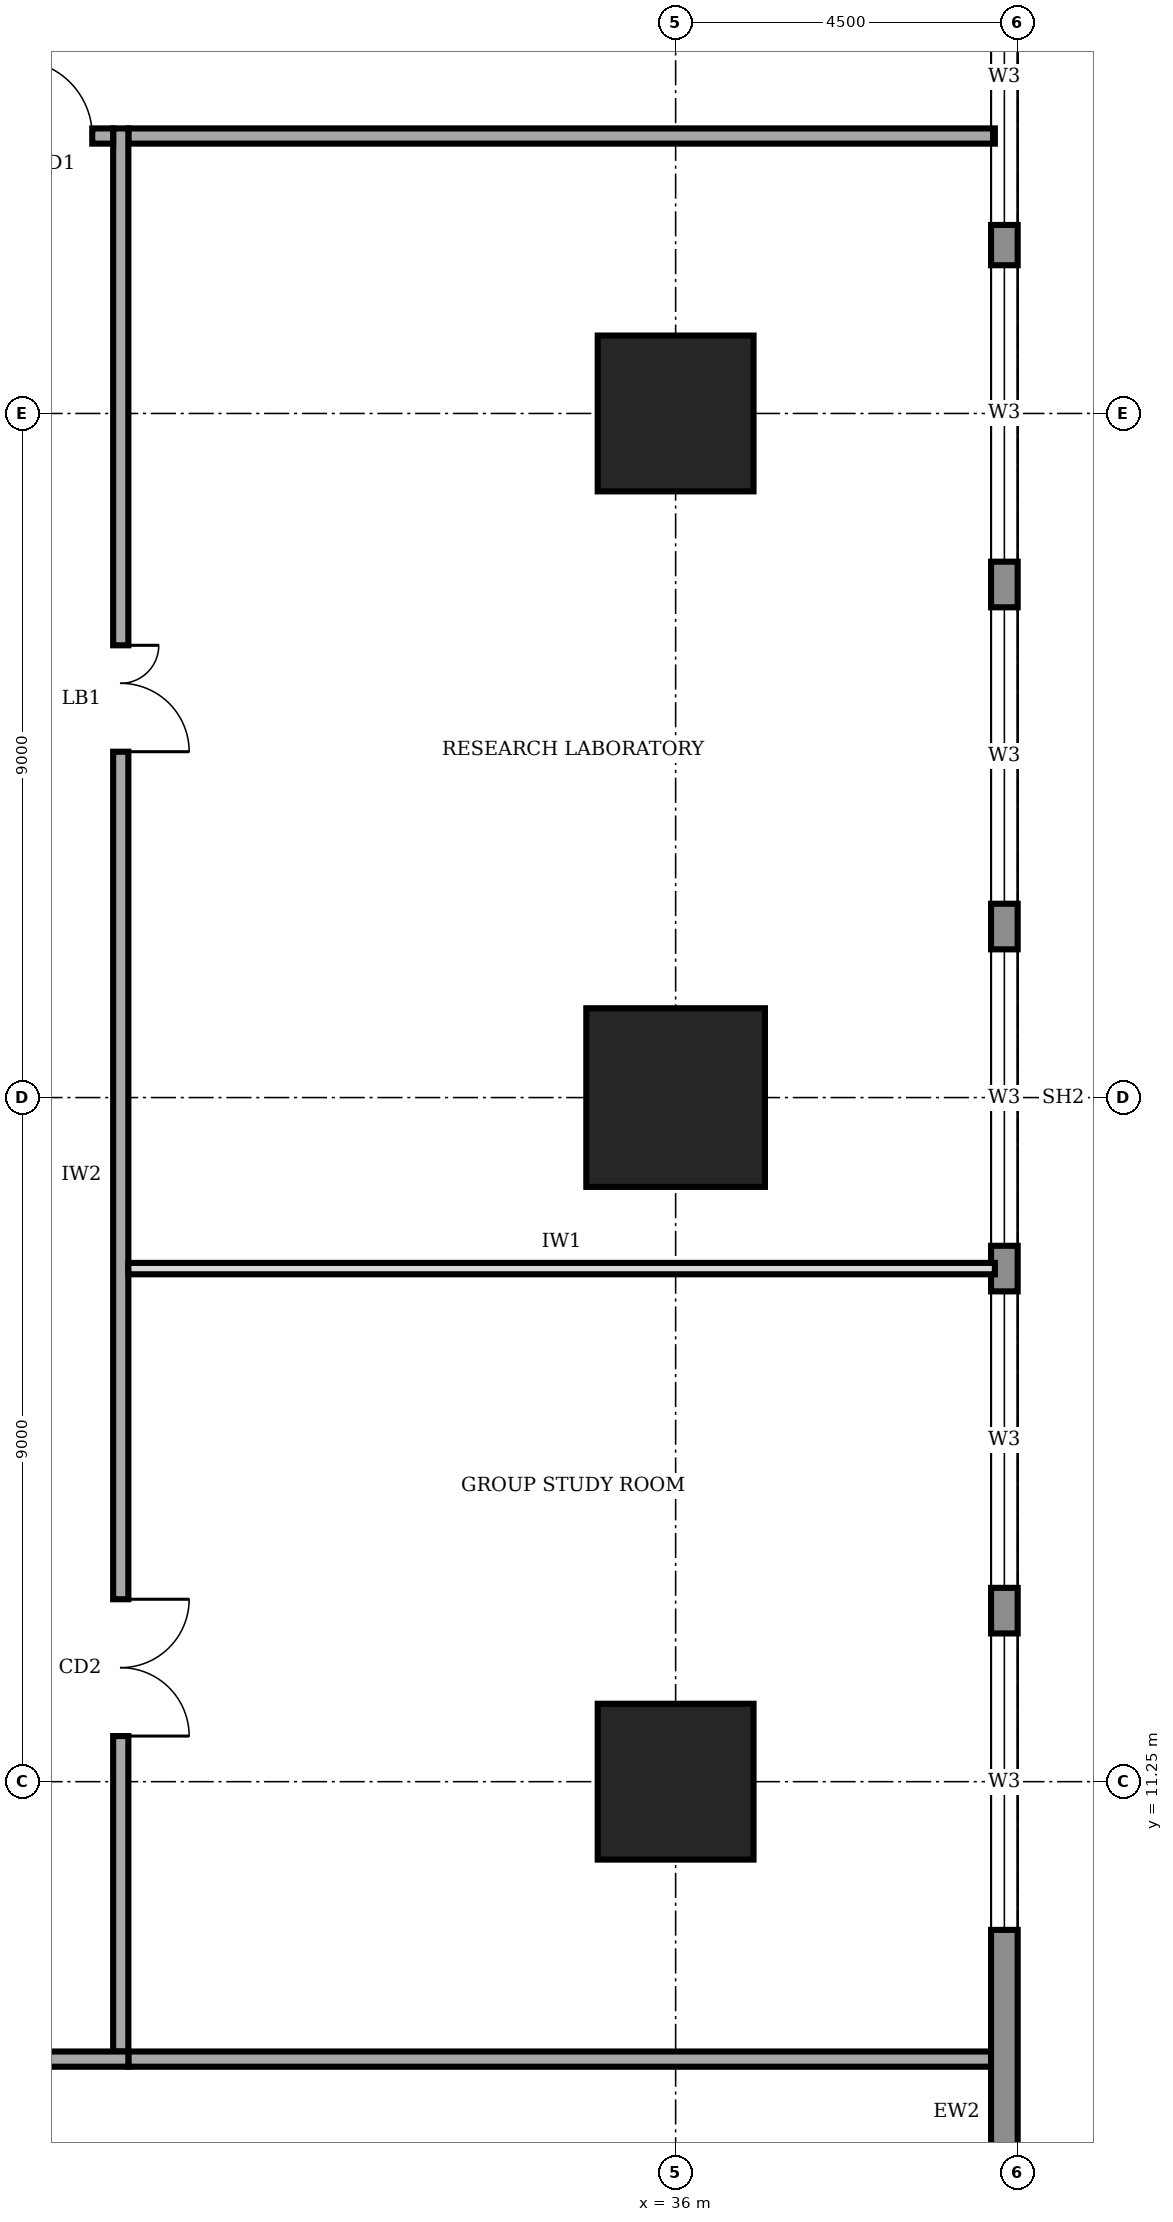
"""IFC4 building model, lengths in metres.
Left out: names, types, materials, properties, quantities, classifications, styles, units other than length and angle.
Written with IfcOpenShell. Run it as: python <this file> out.ifc"""

import sys

from ifc_helpers import new_model, si_unit, direction, frame, frame_2d, origin, origin_2d, place, context, subcontext, project, spatial, rectangle, extrude, element, fill, save


model = new_model("IFC4")
c1 = context("Model", 3, precision=1e-05, world=origin(), true_north=direction((0.0, 1.0)))
c2 = subcontext(c1, "Body", "Model", "MODEL_VIEW")
j1 = project(units=[si_unit("LENGTHUNIT", "METRE"), si_unit("PLANEANGLEUNIT", "RADIAN")], contexts=[c1])
p1 = place(None, origin())
s1 = spatial("IfcSite", under=j1, at=p1, CompositionType="ELEMENT")
p2 = place(p1, origin())
s2 = spatial("IfcBuilding", under=s1, at=p2, CompositionType="ELEMENT")
p3 = place(p2, frame((0.0, 0.0, 189.0)))
s3 = spatial("IfcBuildingStorey", under=s2, at=p3, CompositionType="ELEMENT", Elevation=189.0)
p4 = place(p3, frame((36.0, 11.25, 0.0), z_axis=(0.0, 0.0, 1.0), x_axis=(1.0, 0.0, 0.0)))
e1 = element("IfcColumn", 1, at=p4, inside=s3, PredefinedType="COLUMN", context=c2, shape_type="SweptSolid", body=[
    extrude(rectangle(XDim=2.05, YDim=2.05, at=origin_2d()), origin(), (0.0, 0.0, 1.0), 4.0),
])
p5 = place(p3, frame((36.0, 20.25, 0.0), z_axis=(0.0, 0.0, 1.0), x_axis=(1.0, 0.0, 0.0)))
e2 = element("IfcColumn", 2, at=p5, inside=s3, PredefinedType="COLUMN", context=c2, shape_type="SweptSolid", body=[
    extrude(rectangle(XDim=2.35, YDim=2.35, at=origin_2d()), origin(), (0.0, 0.0, 1.0), 4.0),
])
p6 = place(p3, frame((36.0, 29.25, 0.0), z_axis=(0.0, 0.0, 1.0), x_axis=(1.0, 0.0, 0.0)))
e3 = element("IfcColumn", 3, at=p6, inside=s3, PredefinedType="COLUMN", context=c2, shape_type="SweptSolid", body=[
    extrude(rectangle(XDim=2.05, YDim=2.05, at=origin_2d()), origin(), (0.0, 0.0, 1.0), 4.0),
])
p7 = place(p3, frame((40.325, 4.52, 0.0), z_axis=(0.0, 0.0, 1.0), x_axis=(0.0, 1.0, 0.0)))
e4 = element("IfcWall", 4, at=p7, inside=s3, PredefinedType="STANDARD", context=c2, shape_type="SweptSolid", body=[
    extrude(rectangle(XDim=31.46, YDim=0.35, at=frame_2d((15.73, 0.0))), origin(), (0.0, 0.0, 1.0), 3.75),
])
p8 = place(p7, frame((4.78, 0.0, 0.95)))
e5 = element("IfcOpeningElement", 5, at=p8, cuts=e4, PredefinedType="OPENING", context=c2, shape_type="SweptSolid", body=[
    extrude(rectangle(XDim=3.9, YDim=1.8, at=frame_2d((1.95, 0.9))), frame((0.0, 0.185, 0.0), z_axis=(0.0, -1.0, 0.0), x_axis=(1.0, 0.0, 0.0)), (0.0, 0.0, 1.0), 0.37),
])
p9 = place(p7, frame((9.28, 0.0, 0.95)))
e6 = element("IfcOpeningElement", 6, at=p9, cuts=e4, PredefinedType="OPENING", context=c2, shape_type="SweptSolid", body=[
    extrude(rectangle(XDim=3.9, YDim=1.8, at=frame_2d((1.95, 0.9))), frame((0.0, 0.185, 0.0), z_axis=(0.0, -1.0, 0.0), x_axis=(1.0, 0.0, 0.0)), (0.0, 0.0, 1.0), 0.37),
])
p10 = place(p7, frame((13.78, 0.0, 0.95)))
e7 = element("IfcOpeningElement", 7, at=p10, cuts=e4, PredefinedType="OPENING", context=c2, shape_type="SweptSolid", body=[
    extrude(rectangle(XDim=3.9, YDim=1.8, at=frame_2d((1.95, 0.9))), frame((0.0, 0.185, 0.0), z_axis=(0.0, -1.0, 0.0), x_axis=(1.0, 0.0, 0.0)), (0.0, 0.0, 1.0), 0.37),
])
p11 = place(p7, frame((18.28, 0.0, 0.95)))
e8 = element("IfcOpeningElement", 8, at=p11, cuts=e4, PredefinedType="OPENING", context=c2, shape_type="SweptSolid", body=[
    extrude(rectangle(XDim=3.9, YDim=1.8, at=frame_2d((1.95, 0.9))), frame((0.0, 0.185, 0.0), z_axis=(0.0, -1.0, 0.0), x_axis=(1.0, 0.0, 0.0)), (0.0, 0.0, 1.0), 0.37),
])
p12 = place(p7, frame((22.78, 0.0, 0.95)))
e9 = element("IfcOpeningElement", 9, at=p12, cuts=e4, PredefinedType="OPENING", context=c2, shape_type="SweptSolid", body=[
    extrude(rectangle(XDim=3.9, YDim=1.8, at=frame_2d((1.95, 0.9))), frame((0.0, 0.185, 0.0), z_axis=(0.0, -1.0, 0.0), x_axis=(1.0, 0.0, 0.0)), (0.0, 0.0, 1.0), 0.37),
])
p13 = place(p7, frame((27.21, 0.0, 0.95)))
e10 = element("IfcOpeningElement", 10, at=p13, cuts=e4, PredefinedType="OPENING", context=c2, shape_type="SweptSolid", body=[
    extrude(rectangle(XDim=3.9, YDim=1.8, at=frame_2d((1.95, 0.9))), frame((0.0, 0.185, 0.0), z_axis=(0.0, -1.0, 0.0), x_axis=(1.0, 0.0, 0.0)), (0.0, 0.0, 1.0), 0.37),
])
p14 = place(p3, frame((11.9, 7.6, 0.0), z_axis=(0.0, 0.0, 1.0), x_axis=(1.0, 0.0, 0.0)))
e11 = element("IfcWall", 11, at=p14, inside=s3, PredefinedType="SOLIDWALL", context=c2, shape_type="SweptSolid", body=[
    extrude(rectangle(XDim=16.9, YDim=0.2, at=frame_2d((8.45, 0.0))), origin(), (0.0, 0.0, 1.0), 3.75),
])
p15 = place(p14, frame((2.05, 0.0, 0.0)))
e12 = element("IfcOpeningElement", 12, at=p15, cuts=e11, PredefinedType="OPENING", context=c2, shape_type="SweptSolid", body=[
    extrude(rectangle(XDim=1.8, YDim=2.1, at=frame_2d((0.9, 1.05))), frame((0.0, 0.11, 0.0), z_axis=(0.0, -1.0, 0.0), x_axis=(1.0, 0.0, 0.0)), (0.0, 0.0, 1.0), 0.22),
])
p16 = place(p14, frame((7.85, 0.0, 0.0)))
e13 = element("IfcOpeningElement", 13, at=p16, cuts=e11, PredefinedType="OPENING", context=c2, shape_type="SweptSolid", body=[
    extrude(rectangle(XDim=1.0, YDim=2.1, at=frame_2d((0.5, 1.05))), frame((0.0, 0.11, 0.0), z_axis=(0.0, -1.0, 0.0), x_axis=(1.0, 0.0, 0.0)), (0.0, 0.0, 1.0), 0.22),
])
p17 = place(p14, frame((12.85, 0.0, 0.0)))
e14 = element("IfcOpeningElement", 14, at=p17, cuts=e11, PredefinedType="OPENING", context=c2, shape_type="SweptSolid", body=[
    extrude(rectangle(XDim=1.8, YDim=2.1, at=frame_2d((0.9, 1.05))), frame((0.0, 0.11, 0.0), z_axis=(0.0, -1.0, 0.0), x_axis=(1.0, 0.0, 0.0)), (0.0, 0.0, 1.0), 0.22),
])
p18 = place(p3, frame((28.7, 7.7, 0.0), z_axis=(0.0, 0.0, 1.0), x_axis=(0.0, 1.0, 0.0)))
e15 = element("IfcWall", 15, at=p18, inside=s3, PredefinedType="SOLIDWALL", context=c2, shape_type="SweptSolid", body=[
    extrude(rectangle(XDim=25.3, YDim=0.2, at=frame_2d((12.65, 0.0))), origin(), (0.0, 0.0, 1.0), 3.75),
])
p19 = place(p18, frame((4.15, 0.0, 0.0)))
e16 = element("IfcOpeningElement", 16, at=p19, cuts=e15, PredefinedType="OPENING", context=c2, shape_type="SweptSolid", body=[
    extrude(rectangle(XDim=1.8, YDim=2.1, at=frame_2d((0.9, 1.05))), frame((0.0, 0.11, 0.0), z_axis=(0.0, -1.0, 0.0), x_axis=(1.0, 0.0, 0.0)), (0.0, 0.0, 1.0), 0.22),
])
p20 = place(p18, frame((17.1, 0.0, 0.0)))
e17 = element("IfcOpeningElement", 17, at=p20, cuts=e15, PredefinedType="OPENING", context=c2, shape_type="SweptSolid", body=[
    extrude(rectangle(XDim=1.4, YDim=2.1, at=frame_2d((0.7, 1.05))), frame((0.0, 0.11, 0.0), z_axis=(0.0, -1.0, 0.0), x_axis=(1.0, 0.0, 0.0)), (0.0, 0.0, 1.0), 0.22),
])
p21 = place(p3, frame((28.6, 32.9, 0.0), z_axis=(0.0, 0.0, 1.0), x_axis=(-1.0, 0.0, 0.0)))
e18 = element("IfcWall", 18, at=p21, inside=s3, PredefinedType="SOLIDWALL", context=c2, shape_type="SweptSolid", body=[
    extrude(rectangle(XDim=16.9, YDim=0.2, at=frame_2d((8.45, 0.0))), origin(), (0.0, 0.0, 1.0), 3.75),
])
p22 = place(p21, frame((15.425, 0.0, 0.0)))
e19 = element("IfcOpeningElement", 19, at=p22, cuts=e18, PredefinedType="OPENING", context=c2, shape_type="SweptSolid", body=[
    extrude(rectangle(XDim=1.0, YDim=2.1, at=frame_2d((0.5, 1.05))), frame((0.0, 0.11, 0.0), z_axis=(0.0, -1.0, 0.0), x_axis=(1.0, 0.0, 0.0)), (0.0, 0.0, 1.0), 0.22),
])
p23 = place(p21, frame((12.35, 0.0, 0.0)))
e20 = element("IfcOpeningElement", 20, at=p23, cuts=e18, PredefinedType="OPENING", context=c2, shape_type="SweptSolid", body=[
    extrude(rectangle(XDim=1.0, YDim=2.1, at=frame_2d((0.5, 1.05))), frame((0.0, 0.11, 0.0), z_axis=(0.0, -1.0, 0.0), x_axis=(1.0, 0.0, 0.0)), (0.0, 0.0, 1.0), 0.22),
])
p24 = place(p21, frame((5.6, 0.0, 0.0)))
e21 = element("IfcOpeningElement", 21, at=p24, cuts=e18, PredefinedType="OPENING", context=c2, shape_type="SweptSolid", body=[
    extrude(rectangle(XDim=1.0, YDim=2.1, at=frame_2d((0.5, 1.05))), frame((0.0, 0.11, 0.0), z_axis=(0.0, -1.0, 0.0), x_axis=(1.0, 0.0, 0.0)), (0.0, 0.0, 1.0), 0.22),
])
p25 = place(p21, frame((0.275, 0.0, 0.0)))
e22 = element("IfcOpeningElement", 22, at=p25, cuts=e18, PredefinedType="OPENING", context=c2, shape_type="SweptSolid", body=[
    extrude(rectangle(XDim=1.0, YDim=2.1, at=frame_2d((0.5, 1.05))), frame((0.0, 0.11, 0.0), z_axis=(0.0, -1.0, 0.0), x_axis=(1.0, 0.0, 0.0)), (0.0, 0.0, 1.0), 0.22),
])
for number, where, z_axis, x_axis in (
    (23, (28.8, 7.6, 0.0), (0.0, 0.0, 1.0), (1.0, 0.0, 0.0)),
    (24, (28.8, 32.9, 0.0), (0.0, 0.0, 1.0), (1.0, 0.0, 0.0)),
):
    element("IfcWall", number, at=place(p3, frame(where, z_axis=z_axis, x_axis=x_axis)), inside=s3, PredefinedType="SOLIDWALL", context=c2, shape_type="SweptSolid", body=[
        extrude(rectangle(XDim=11.4, YDim=0.2, at=frame_2d((5.7, 0.0))), origin(), (0.0, 0.0, 1.0), 3.75),
    ])
p26 = place(p3, frame((28.8, 18.0, 0.0), z_axis=(0.0, 0.0, 1.0), x_axis=(1.0, 0.0, 0.0)))
e25 = element("IfcWall", 25, at=p26, inside=s3, PredefinedType="PARTITIONING", context=c2, shape_type="SweptSolid", body=[
    extrude(rectangle(XDim=11.4, YDim=0.15, at=frame_2d((5.7, 0.0))), origin(), (0.0, 0.0, 1.0), 3.75),
])
p27 = place(p8, origin())
e26 = element("IfcWindow", 26, at=p27, inside=s3, PartitioningType="SINGLE_PANEL", PredefinedType="WINDOW", context=c2, shape_type="SweptSolid", body=[
    extrude(rectangle(XDim=3.9, YDim=1.8, at=frame_2d((1.95, 0.9))), frame((0.0, 0.03, 0.0), z_axis=(0.0, -1.0, 0.0), x_axis=(1.0, 0.0, 0.0)), (0.0, 0.0, 1.0), 0.06),
])
fill(e5, e26)
p28 = place(p9, origin())
e27 = element("IfcWindow", 27, at=p28, inside=s3, PartitioningType="SINGLE_PANEL", PredefinedType="WINDOW", context=c2, shape_type="SweptSolid", body=[
    extrude(rectangle(XDim=3.9, YDim=1.8, at=frame_2d((1.95, 0.9))), frame((0.0, 0.03, 0.0), z_axis=(0.0, -1.0, 0.0), x_axis=(1.0, 0.0, 0.0)), (0.0, 0.0, 1.0), 0.06),
])
fill(e6, e27)
p29 = place(p10, origin())
e28 = element("IfcWindow", 28, at=p29, inside=s3, PartitioningType="SINGLE_PANEL", PredefinedType="WINDOW", context=c2, shape_type="SweptSolid", body=[
    extrude(rectangle(XDim=3.9, YDim=1.8, at=frame_2d((1.95, 0.9))), frame((0.0, 0.03, 0.0), z_axis=(0.0, -1.0, 0.0), x_axis=(1.0, 0.0, 0.0)), (0.0, 0.0, 1.0), 0.06),
])
fill(e7, e28)
p30 = place(p11, origin())
e29 = element("IfcWindow", 29, at=p30, inside=s3, PartitioningType="SINGLE_PANEL", PredefinedType="WINDOW", context=c2, shape_type="SweptSolid", body=[
    extrude(rectangle(XDim=3.9, YDim=1.8, at=frame_2d((1.95, 0.9))), frame((0.0, 0.03, 0.0), z_axis=(0.0, -1.0, 0.0), x_axis=(1.0, 0.0, 0.0)), (0.0, 0.0, 1.0), 0.06),
])
fill(e8, e29)
p31 = place(p12, origin())
e30 = element("IfcWindow", 30, at=p31, inside=s3, PartitioningType="SINGLE_PANEL", PredefinedType="WINDOW", context=c2, shape_type="SweptSolid", body=[
    extrude(rectangle(XDim=3.9, YDim=1.8, at=frame_2d((1.95, 0.9))), frame((0.0, 0.03, 0.0), z_axis=(0.0, -1.0, 0.0), x_axis=(1.0, 0.0, 0.0)), (0.0, 0.0, 1.0), 0.06),
])
fill(e9, e30)
p32 = place(p13, origin())
e31 = element("IfcWindow", 31, at=p32, inside=s3, PartitioningType="SINGLE_PANEL", PredefinedType="WINDOW", context=c2, shape_type="SweptSolid", body=[
    extrude(rectangle(XDim=3.9, YDim=1.8, at=frame_2d((1.95, 0.9))), frame((0.0, 0.03, 0.0), z_axis=(0.0, -1.0, 0.0), x_axis=(1.0, 0.0, 0.0)), (0.0, 0.0, 1.0), 0.06),
])
fill(e10, e31)
p33 = place(p19, frame((1.8, 0.0, 0.0), z_axis=(0.0, 0.0, 1.0), x_axis=(-1.0, 0.0, 0.0)))
e32 = element("IfcDoor", 32, at=p33, inside=s3, OperationType="DOUBLE_DOOR_SINGLE_SWING", PredefinedType="DOOR", context=c2, shape_type="SweptSolid", body=[
    extrude(rectangle(XDim=1.8, YDim=2.1, at=frame_2d((0.9, 1.05))), frame((0.0, 0.025, 0.0), z_axis=(0.0, -1.0, 0.0), x_axis=(1.0, 0.0, 0.0)), (0.0, 0.0, 1.0), 0.05),
])
fill(e16, e32)
p34 = place(p20, frame((1.4, 0.0, 0.0), z_axis=(0.0, 0.0, 1.0), x_axis=(-1.0, 0.0, 0.0)))
e33 = element("IfcDoor", 33, at=p34, inside=s3, OperationType="DOUBLE_DOOR_SINGLE_SWING", PredefinedType="DOOR", context=c2, shape_type="SweptSolid", body=[
    extrude(rectangle(XDim=1.4, YDim=2.1, at=frame_2d((0.7, 1.05))), frame((0.0, 0.025, 0.0), z_axis=(0.0, -1.0, 0.0), x_axis=(1.0, 0.0, 0.0)), (0.0, 0.0, 1.0), 0.05),
])
fill(e17, e33)
p35 = place(p25, frame((1.0, 0.0, 0.0), z_axis=(0.0, 0.0, 1.0), x_axis=(-1.0, 0.0, 0.0)))
e34 = element("IfcDoor", 34, at=p35, inside=s3, OperationType="SINGLE_SWING_LEFT", PredefinedType="DOOR", context=c2, shape_type="SweptSolid", body=[
    extrude(rectangle(XDim=1.0, YDim=2.1, at=frame_2d((0.5, 1.05))), frame((0.0, 0.025, 0.0), z_axis=(0.0, -1.0, 0.0), x_axis=(1.0, 0.0, 0.0)), (0.0, 0.0, 1.0), 0.05),
])
fill(e22, e34)
save(model, sys.argv[1])
